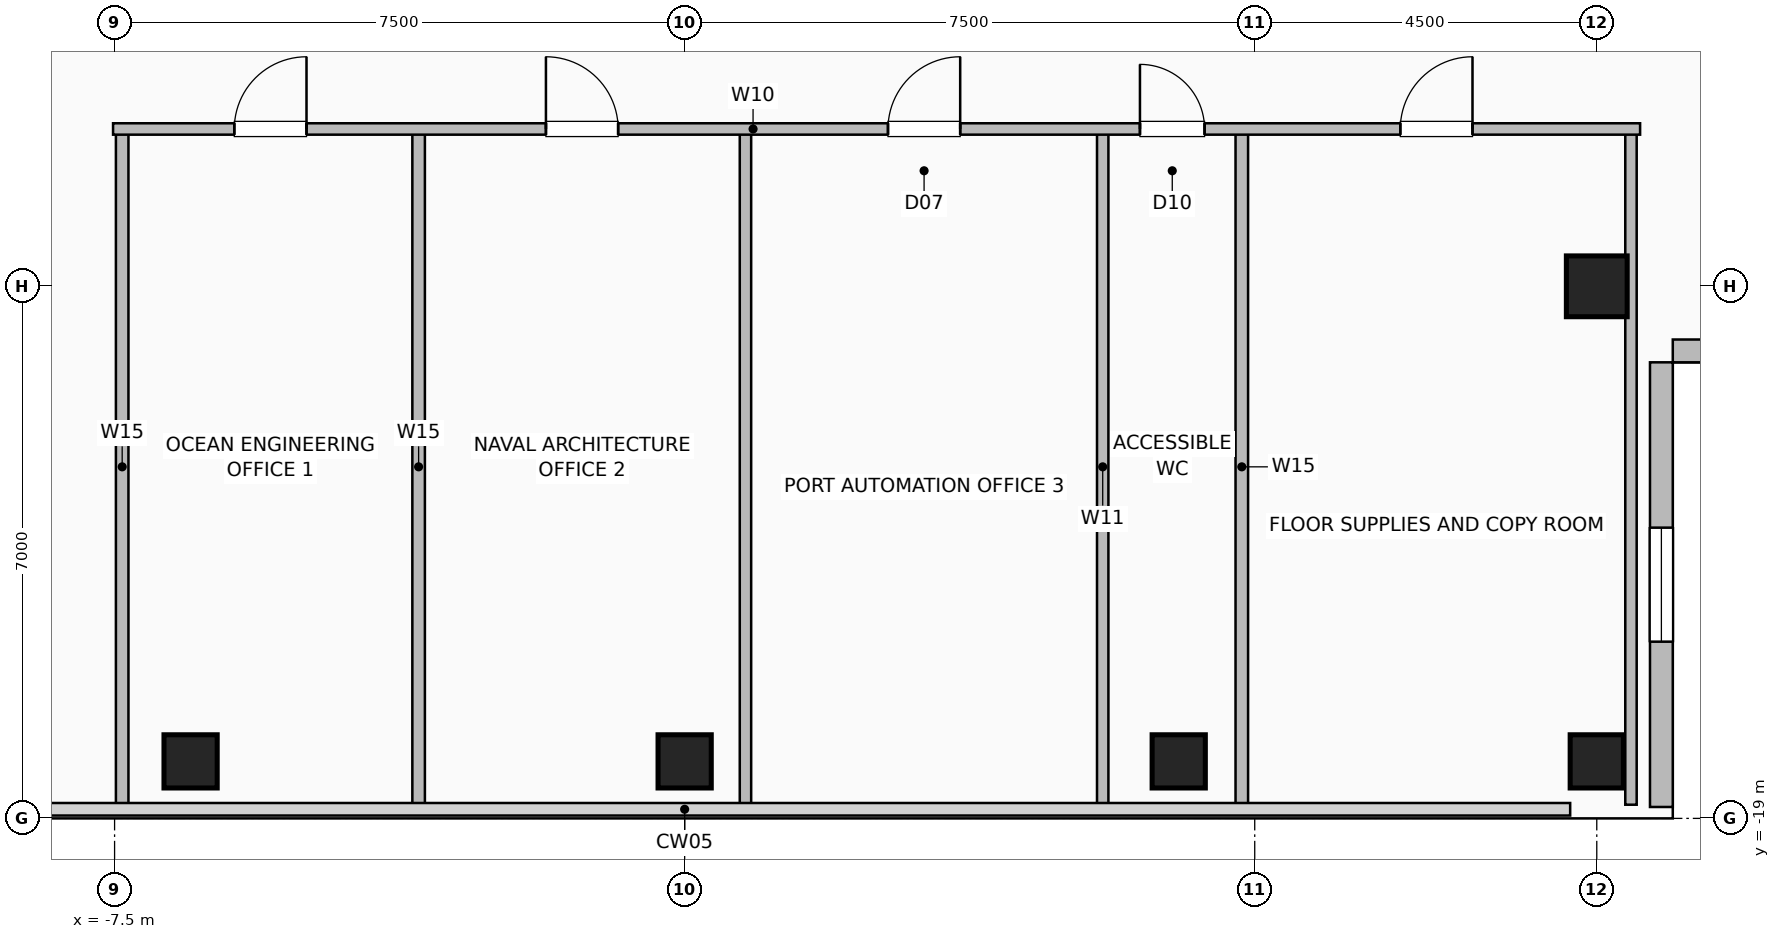
"""IFC4 building model, lengths in metres.
Left out: names, types, materials, properties, quantities, classifications, styles, units other than length and angle.
Written with IfcOpenShell. Run it as: python <this file> out.ifc"""

import sys

from ifc_helpers import new_model, si_unit, direction, frame, frame_2d, origin, origin_2d, place, context, subcontext, project, spatial, rectangle, hollow_rectangle, extrude, element, fill, save


model = new_model("IFC4")
c1 = context("Model", 3, precision=1e-05, world=origin(), true_north=direction((0.0, 1.0)))
c2 = subcontext(c1, "Body", "Model", "MODEL_VIEW")
j1 = project(units=[si_unit("LENGTHUNIT", "METRE"), si_unit("PLANEANGLEUNIT", "RADIAN")], contexts=[c1])
p1 = place(None, origin())
s1 = spatial("IfcSite", under=j1, at=p1, CompositionType="ELEMENT")
p2 = place(p1, origin())
s2 = spatial("IfcBuilding", under=s1, at=p2, CompositionType="ELEMENT")
p3 = place(p2, frame((0.0, 0.0, 286.4)))
s3 = spatial("IfcBuildingStorey", under=s2, at=p3, CompositionType="ELEMENT", Elevation=286.4)
for number, where, z_axis, x_axis in (
    (1, (-6.5, -18.25, 0.0), (0.0, 0.0, 1.0), (1.0, 0.0, 0.0)),
    (2, (0.0, -18.25, 0.0), (0.0, 0.0, 1.0), (1.0, 0.0, 0.0)),
    (3, (6.5, -18.25, 0.0), (0.0, 0.0, 1.0), (1.0, 0.0, 0.0)),
    (4, (12.0, -18.25, 0.0), (0.0, 0.0, 1.0), (1.0, 0.0, 0.0)),
):
    element("IfcColumn", number, at=place(p3, frame(where, z_axis=z_axis, x_axis=x_axis)), inside=s3, PredefinedType="COLUMN", context=c2, shape_type="SweptSolid", body=[
        extrude(hollow_rectangle(XDim=0.7, YDim=0.7, WallThickness=0.035, at=origin_2d()), origin(), (0.0, 0.0, 1.0), 3.6),
    ])
p4 = place(p3, frame((12.0, -12.0, 0.0), z_axis=(0.0, 0.0, 1.0), x_axis=(1.0, 0.0, 0.0)))
e5 = element("IfcColumn", 5, at=p4, inside=s3, PredefinedType="COLUMN", context=c2, shape_type="SweptSolid", body=[
    extrude(hollow_rectangle(XDim=0.8, YDim=0.8, WallThickness=0.04, at=origin_2d()), origin(), (0.0, 0.0, 1.0), 3.6),
])
p5 = place(p3, frame((12.85, -18.85, 0.0), z_axis=(0.0, 0.0, 1.0), x_axis=(0.0, 1.0, 0.0)))
e6 = element("IfcWall", 6, at=p5, inside=s3, PredefinedType="SOLIDWALL", context=c2, shape_type="SweptSolid", body=[
    extrude(rectangle(XDim=5.85, YDim=0.3, at=frame_2d((2.925, 0.0))), origin(), (0.0, 0.0, 1.0), 3.36),
])
p6 = place(p5, frame((2.175, 0.0, 0.9)))
e7 = element("IfcOpeningElement", 7, at=p6, cuts=e6, PredefinedType="OPENING", context=c2, shape_type="SweptSolid", body=[
    extrude(rectangle(XDim=1.5, YDim=1.8, at=frame_2d((0.75, 0.9))), frame((0.0, 0.16, 0.0), z_axis=(0.0, -1.0, 0.0), x_axis=(1.0, 0.0, 0.0)), (0.0, 0.0, 1.0), 0.32),
])
p7 = place(p3, frame((18.85, -12.85, 0.0), z_axis=(0.0, 0.0, 1.0), x_axis=(-1.0, 0.0, 0.0)))
e8 = element("IfcWall", 8, at=p7, inside=s3, PredefinedType="SOLIDWALL", context=c2, shape_type="SweptSolid", body=[
    extrude(rectangle(XDim=5.85, YDim=0.3, at=frame_2d((2.925, 0.0))), origin(), (0.0, 0.0, 1.0), 3.36),
])
for number, where, z_axis, x_axis in (
    (9, (7.33, -18.82, 0.0), (0.0, 0.0, 1.0), (0.0, 1.0, 0.0)),
    (10, (-7.4, -18.82, 0.0), (0.0, 0.0, 1.0), (0.0, 1.0, 0.0)),
    (11, (-3.5, -18.82, 0.0), (0.0, 0.0, 1.0), (0.0, 1.0, 0.0)),
):
    element("IfcWall", number, at=place(p3, frame(where, z_axis=z_axis, x_axis=x_axis)), inside=s3, PredefinedType="PLUMBINGWALL", context=c2, shape_type="SweptSolid", body=[
        extrude(rectangle(XDim=8.89, YDim=0.165, at=frame_2d((4.445, 0.0))), origin(), (0.0, 0.0, 1.0), 3.36),
    ])
for number, where, z_axis, x_axis in (
    (12, (0.8, -18.82, 0.0), (0.0, 0.0, 1.0), (0.0, 1.0, 0.0)),
    (13, (5.5, -18.82, 0.0), (0.0, 0.0, 1.0), (0.0, 1.0, 0.0)),
    (14, (12.45, -18.82, 0.0), (0.0, 0.0, 1.0), (0.0, 1.0, 0.0)),
):
    element("IfcWall", number, at=place(p3, frame(where, z_axis=z_axis, x_axis=x_axis)), inside=s3, PredefinedType="PARTITIONING", context=c2, shape_type="SweptSolid", body=[
        extrude(rectangle(XDim=8.89, YDim=0.15, at=frame_2d((4.445, 0.0))), origin(), (0.0, 0.0, 1.0), 3.36),
    ])
p8 = place(p3, frame((-7.52, -9.93, 0.0), z_axis=(0.0, 0.0, 1.0), x_axis=(1.0, 0.0, 0.0)))
e15 = element("IfcWall", 15, at=p8, inside=s3, PredefinedType="PARTITIONING", context=c2, shape_type="SweptSolid", body=[
    extrude(rectangle(XDim=20.09, YDim=0.15, at=frame_2d((10.045, 0.0))), origin(), (0.0, 0.0, 1.0), 3.36),
])
p9 = place(p8, frame((1.595, 0.0, 0.0)))
e16 = element("IfcOpeningElement", 16, at=p9, cuts=e15, PredefinedType="OPENING", context=c2, shape_type="SweptSolid", body=[
    extrude(rectangle(XDim=0.95, YDim=2.06, at=frame_2d((0.475, 1.03))), frame((0.0, 0.085, 0.0), z_axis=(0.0, -1.0, 0.0), x_axis=(1.0, 0.0, 0.0)), (0.0, 0.0, 1.0), 0.17),
])
p10 = place(p8, frame((5.695, 0.0, 0.0)))
e17 = element("IfcOpeningElement", 17, at=p10, cuts=e15, PredefinedType="OPENING", context=c2, shape_type="SweptSolid", body=[
    extrude(rectangle(XDim=0.95, YDim=2.06, at=frame_2d((0.475, 1.03))), frame((0.0, 0.085, 0.0), z_axis=(0.0, -1.0, 0.0), x_axis=(1.0, 0.0, 0.0)), (0.0, 0.0, 1.0), 0.17),
])
p11 = place(p8, frame((10.195, 0.0, 0.0)))
e18 = element("IfcOpeningElement", 18, at=p11, cuts=e15, PredefinedType="OPENING", context=c2, shape_type="SweptSolid", body=[
    extrude(rectangle(XDim=0.95, YDim=2.06, at=frame_2d((0.475, 1.03))), frame((0.0, 0.085, 0.0), z_axis=(0.0, -1.0, 0.0), x_axis=(1.0, 0.0, 0.0)), (0.0, 0.0, 1.0), 0.17),
])
p12 = place(p8, frame((13.51, 0.0, 0.0)))
e19 = element("IfcOpeningElement", 19, at=p12, cuts=e15, PredefinedType="OPENING", context=c2, shape_type="SweptSolid", body=[
    extrude(rectangle(XDim=0.85, YDim=2.05, at=frame_2d((0.425, 1.025))), frame((0.0, 0.085, 0.0), z_axis=(0.0, -1.0, 0.0), x_axis=(1.0, 0.0, 0.0)), (0.0, 0.0, 1.0), 0.17),
])
p13 = place(p8, frame((16.935, 0.0, 0.0)))
e20 = element("IfcOpeningElement", 20, at=p13, cuts=e15, PredefinedType="OPENING", context=c2, shape_type="SweptSolid", body=[
    extrude(rectangle(XDim=0.95, YDim=2.06, at=frame_2d((0.475, 1.03))), frame((0.0, 0.085, 0.0), z_axis=(0.0, -1.0, 0.0), x_axis=(1.0, 0.0, 0.0)), (0.0, 0.0, 1.0), 0.17),
])
p14 = place(p6, origin())
e21 = element("IfcWindow", 21, at=p14, inside=s3, PartitioningType="SINGLE_PANEL", PredefinedType="WINDOW", context=c2, shape_type="SweptSolid", body=[
    extrude(rectangle(XDim=1.5, YDim=1.8, at=frame_2d((0.75, 0.9))), frame((0.0, 0.03, 0.0), z_axis=(0.0, -1.0, 0.0), x_axis=(1.0, 0.0, 0.0)), (0.0, 0.0, 1.0), 0.06),
])
fill(e7, e21)
p15 = place(p9, origin())
e22 = element("IfcDoor", 22, at=p15, inside=s3, OperationType="SINGLE_SWING_RIGHT", PredefinedType="DOOR", context=c2, shape_type="SweptSolid", body=[
    extrude(rectangle(XDim=0.95, YDim=2.06, at=frame_2d((0.475, 1.03))), frame((0.0, 0.025, 0.0), z_axis=(0.0, -1.0, 0.0), x_axis=(1.0, 0.0, 0.0)), (0.0, 0.0, 1.0), 0.05),
])
fill(e16, e22)
p16 = place(p10, origin())
e23 = element("IfcDoor", 23, at=p16, inside=s3, OperationType="SINGLE_SWING_LEFT", PredefinedType="DOOR", context=c2, shape_type="SweptSolid", body=[
    extrude(rectangle(XDim=0.95, YDim=2.06, at=frame_2d((0.475, 1.03))), frame((0.0, 0.025, 0.0), z_axis=(0.0, -1.0, 0.0), x_axis=(1.0, 0.0, 0.0)), (0.0, 0.0, 1.0), 0.05),
])
fill(e17, e23)
p17 = place(p11, origin())
e24 = element("IfcDoor", 24, at=p17, inside=s3, OperationType="SINGLE_SWING_RIGHT", PredefinedType="DOOR", context=c2, shape_type="SweptSolid", body=[
    extrude(rectangle(XDim=0.95, YDim=2.06, at=frame_2d((0.475, 1.03))), frame((0.0, 0.025, 0.0), z_axis=(0.0, -1.0, 0.0), x_axis=(1.0, 0.0, 0.0)), (0.0, 0.0, 1.0), 0.05),
])
fill(e18, e24)
p18 = place(p12, origin())
e25 = element("IfcDoor", 25, at=p18, inside=s3, OperationType="SINGLE_SWING_LEFT", PredefinedType="DOOR", context=c2, shape_type="SweptSolid", body=[
    extrude(rectangle(XDim=0.85, YDim=2.05, at=frame_2d((0.425, 1.025))), frame((0.0, 0.025, 0.0), z_axis=(0.0, -1.0, 0.0), x_axis=(1.0, 0.0, 0.0)), (0.0, 0.0, 1.0), 0.05),
])
fill(e19, e25)
p19 = place(p13, origin())
e26 = element("IfcDoor", 26, at=p19, inside=s3, OperationType="SINGLE_SWING_RIGHT", PredefinedType="DOOR", context=c2, shape_type="SweptSolid", body=[
    extrude(rectangle(XDim=0.95, YDim=2.06, at=frame_2d((0.475, 1.03))), frame((0.0, 0.025, 0.0), z_axis=(0.0, -1.0, 0.0), x_axis=(1.0, 0.0, 0.0)), (0.0, 0.0, 1.0), 0.05),
])
fill(e20, e26)
save(model, sys.argv[1])
